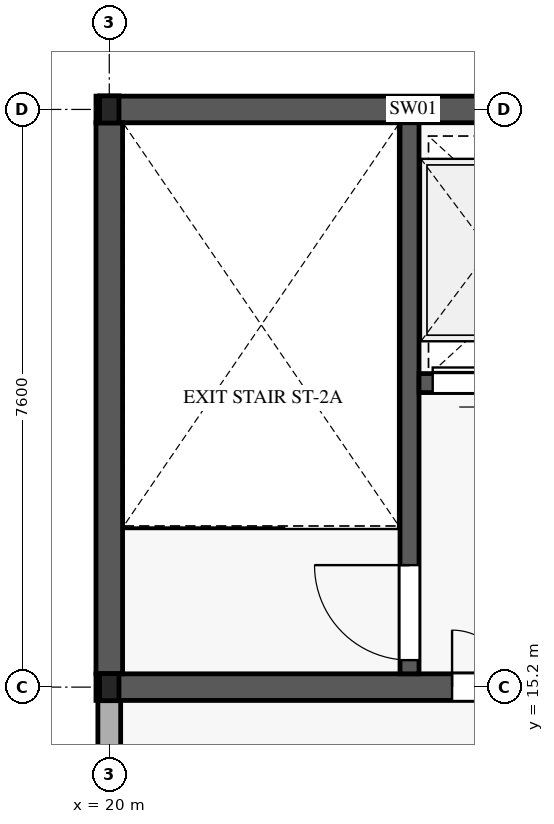
"""IFC4 building model, lengths in metres.
Left out: names, types, materials, properties, quantities, classifications, styles, units other than length and angle.
Written with IfcOpenShell. Run it as: python <this file> out.ifc"""

import sys

from ifc_helpers import new_model, si_unit, direction, frame, frame_2d, origin, origin_2d, place, context, subcontext, project, spatial, rectangle, i_section, extrude, element, fill, save


model = new_model("IFC4")
c1 = context("Model", 3, precision=1e-05, world=origin(), true_north=direction((0.0, 1.0)))
c2 = subcontext(c1, "Body", "Model", "MODEL_VIEW")
j1 = project(units=[si_unit("LENGTHUNIT", "METRE"), si_unit("PLANEANGLEUNIT", "RADIAN")], contexts=[c1])
p1 = place(None, origin())
s1 = spatial("IfcSite", under=j1, at=p1, CompositionType="ELEMENT")
p2 = place(p1, origin())
s2 = spatial("IfcBuilding", under=s1, at=p2, CompositionType="ELEMENT")
p3 = place(p2, frame((0.0, 0.0, 42.0)))
s3 = spatial("IfcBuildingStorey", under=s2, at=p3, CompositionType="ELEMENT", Elevation=42.0)
for number, where, z_axis, x_axis in (
    (1, (20.0, 15.2, 0.0), (0.0, 0.0, 1.0), (1.0, 0.0, 0.0)),
    (2, (20.0, 22.8, 0.0), (0.0, 0.0, 1.0), (1.0, 0.0, 0.0)),
):
    element("IfcColumn", number, at=place(p3, frame(where, z_axis=z_axis, x_axis=x_axis)), inside=s3, PredefinedType="COLUMN", context=c2, shape_type="SweptSolid", body=[
        extrude(i_section(OverallWidth=0.255, OverallDepth=0.357, WebThickness=0.01, FlangeThickness=0.018, FilletRadius=0.015, at=origin_2d()), origin(), (0.0, 0.0, 1.0), 3.995),
    ])
p4 = place(p3, frame((20.0, 7.58, 0.0), z_axis=(0.0, 0.0, 1.0), x_axis=(0.0, 1.0, 0.0)))
e3 = element("IfcWall", 3, at=p4, inside=s3, PredefinedType="STANDARD", context=c2, shape_type="SweptSolid", body=[
    extrude(rectangle(XDim=7.64, YDim=0.3, at=frame_2d((3.82, 0.0))), origin(), (0.0, 0.0, 1.0), 3.06),
])
p5 = place(p4, frame((2.895, 0.0, 0.75)))
e4 = element("IfcOpeningElement", 4, at=p5, cuts=e3, PredefinedType="OPENING", context=c2, shape_type="SweptSolid", body=[
    extrude(rectangle(XDim=1.85, YDim=1.9, at=frame_2d((0.925, 0.95))), frame((0.0, 0.16, 0.0), z_axis=(0.0, -1.0, 0.0), x_axis=(1.0, 0.0, 0.0)), (0.0, 0.0, 1.0), 0.32),
])
p6 = place(p3, frame((19.825, 15.2, 0.0), z_axis=(0.0, 0.0, 1.0), x_axis=(1.0, 0.0, 0.0)))
e5 = element("IfcWall", 5, at=p6, inside=s3, PredefinedType="SHEAR", context=c2, shape_type="SweptSolid", body=[
    extrude(rectangle(XDim=8.35, YDim=0.35, at=frame_2d((4.175, 0.0))), origin(), (0.0, 0.0, 1.0), 3.99),
])
p7 = place(p6, frame((4.685, 0.0, 0.0)))
e6 = element("IfcOpeningElement", 6, at=p7, cuts=e5, PredefinedType="OPENING", context=c2, shape_type="SweptSolid", body=[
    extrude(rectangle(XDim=1.5, YDim=2.2, at=frame_2d((0.75, 1.1))), frame((0.0, 0.185, 0.0), z_axis=(0.0, -1.0, 0.0), x_axis=(1.0, 0.0, 0.0)), (0.0, 0.0, 1.0), 0.37),
])
p8 = place(p3, frame((19.825, 22.8, 0.0), z_axis=(0.0, 0.0, 1.0), x_axis=(1.0, 0.0, 0.0)))
e7 = element("IfcWall", 7, at=p8, inside=s3, PredefinedType="SHEAR", context=c2, shape_type="SweptSolid", body=[
    extrude(rectangle(XDim=8.35, YDim=0.35, at=frame_2d((4.175, 0.0))), origin(), (0.0, 0.0, 1.0), 3.99),
])
p9 = place(p3, frame((20.0, 15.375, 0.0), z_axis=(0.0, 0.0, 1.0), x_axis=(0.0, 1.0, 0.0)))
e8 = element("IfcWall", 8, at=p9, inside=s3, PredefinedType="SHEAR", context=c2, shape_type="SweptSolid", body=[
    extrude(rectangle(XDim=7.25, YDim=0.35, at=frame_2d((3.625, 0.0))), origin(), (0.0, 0.0, 1.0), 3.99),
])
p10 = place(p3, frame((23.95, 15.375, 0.0), z_axis=(0.0, 0.0, 1.0), x_axis=(0.0, 1.0, 0.0)))
e9 = element("IfcWall", 9, at=p10, inside=s3, PredefinedType="SHEAR", context=c2, shape_type="SweptSolid", body=[
    extrude(rectangle(XDim=7.25, YDim=0.25, at=frame_2d((3.625, 0.0))), origin(), (0.0, 0.0, 1.0), 3.99),
])
p11 = place(p10, frame((0.18, 0.0, 0.0)))
e10 = element("IfcOpeningElement", 10, at=p11, cuts=e9, PredefinedType="OPENING", context=c2, shape_type="SweptSolid", body=[
    extrude(rectangle(XDim=1.25, YDim=2.2, at=frame_2d((0.625, 1.1))), frame((0.0, 0.135, 0.0), z_axis=(0.0, -1.0, 0.0), x_axis=(1.0, 0.0, 0.0)), (0.0, 0.0, 1.0), 0.27),
])
p12 = place(p3, frame((24.075, 19.2, 0.0), z_axis=(0.0, 0.0, 1.0), x_axis=(1.0, 0.0, 0.0)))
e11 = element("IfcWall", 11, at=p12, inside=s3, PredefinedType="SHEAR", context=c2, shape_type="SweptSolid", body=[
    extrude(rectangle(XDim=3.75, YDim=0.25, at=frame_2d((1.875, 0.0))), origin(), (0.0, 0.0, 1.0), 3.99),
])
p13 = place(p12, frame((0.18, 0.0, 0.0)))
e12 = element("IfcOpeningElement", 12, at=p13, cuts=e11, PredefinedType="OPENING", context=c2, shape_type="SweptSolid", body=[
    extrude(rectangle(XDim=1.2, YDim=2.2, at=frame_2d((0.6, 1.1))), frame((0.0, 0.135, 0.0), z_axis=(0.0, -1.0, 0.0), x_axis=(1.0, 0.0, 0.0)), (0.0, 0.0, 1.0), 0.27),
])
p14 = place(p12, frame((1.55, 0.0, 0.0)))
e13 = element("IfcOpeningElement", 13, at=p14, cuts=e11, PredefinedType="OPENING", context=c2, shape_type="SweptSolid", body=[
    extrude(rectangle(XDim=1.05, YDim=2.2, at=frame_2d((0.525, 1.1))), frame((0.0, 0.135, 0.0), z_axis=(0.0, -1.0, 0.0), x_axis=(1.0, 0.0, 0.0)), (0.0, 0.0, 1.0), 0.27),
])
p15 = place(p11, origin())
e14 = element("IfcDoor", 14, at=p15, inside=s3, OperationType="SINGLE_SWING_RIGHT", PredefinedType="DOOR", context=c2, shape_type="SweptSolid", body=[
    extrude(rectangle(XDim=1.25, YDim=2.2, at=frame_2d((0.625, 1.1))), frame((0.0, 0.025, 0.0), z_axis=(0.0, -1.0, 0.0), x_axis=(1.0, 0.0, 0.0)), (0.0, 0.0, 1.0), 0.05),
])
fill(e10, e14)
p16 = place(p7, origin())
e15 = element("IfcDoor", 15, at=p16, inside=s3, OperationType="DOUBLE_DOOR_SINGLE_SWING", PredefinedType="DOOR", context=c2, shape_type="SweptSolid", body=[
    extrude(rectangle(XDim=1.5, YDim=2.2, at=frame_2d((0.75, 1.1))), frame((0.0, 0.025, 0.0), z_axis=(0.0, -1.0, 0.0), x_axis=(1.0, 0.0, 0.0)), (0.0, 0.0, 1.0), 0.05),
])
fill(e6, e15)
p17 = place(p13, origin())
e16 = element("IfcDoor", 16, at=p17, inside=s3, OperationType="SLIDING_TO_LEFT", PredefinedType="DOOR", context=c2, shape_type="SweptSolid", body=[
    extrude(rectangle(XDim=1.2, YDim=2.2, at=frame_2d((0.6, 1.1))), frame((0.0, 0.025, 0.0), z_axis=(0.0, -1.0, 0.0), x_axis=(1.0, 0.0, 0.0)), (0.0, 0.0, 1.0), 0.05),
])
fill(e12, e16)
save(model, sys.argv[1])
